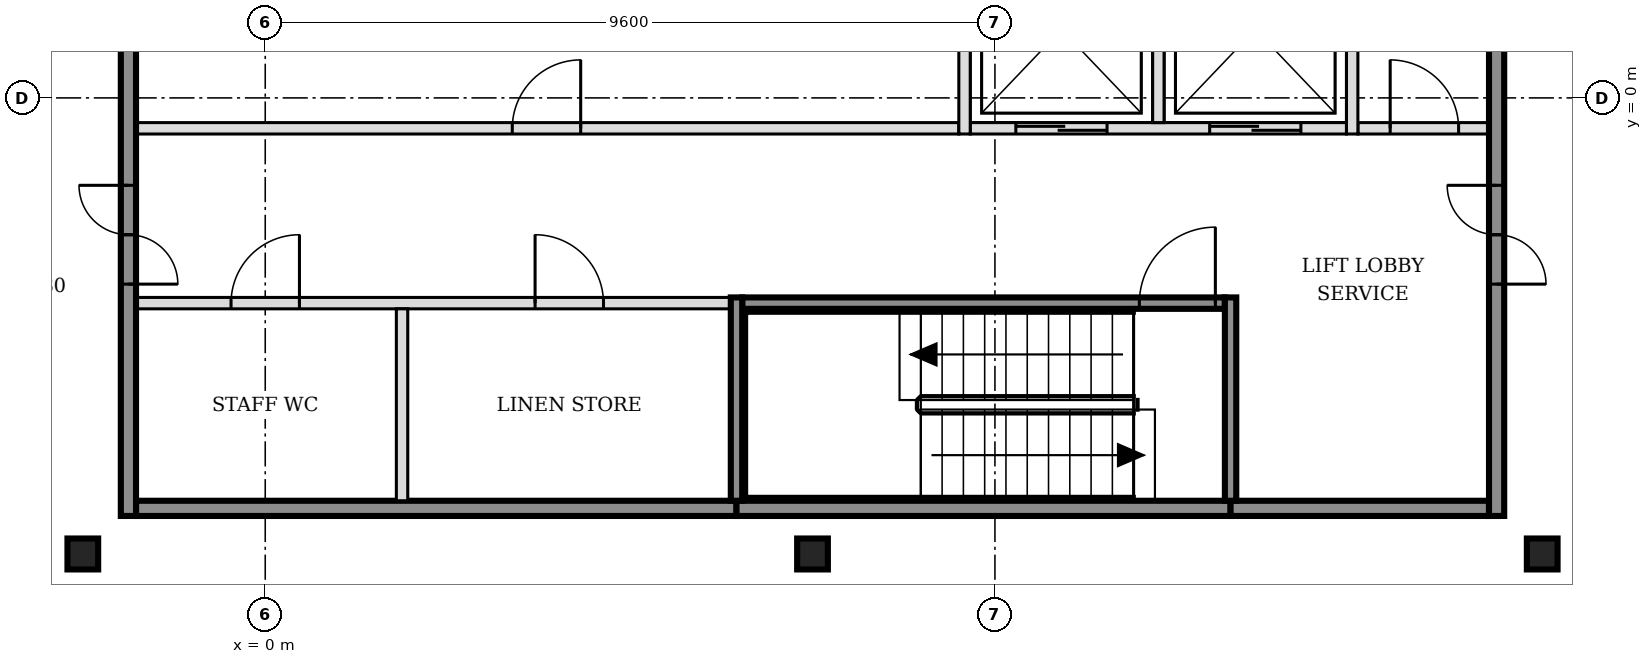
"""IFC4 building model, lengths in metres.
Left out: names, types, materials, properties, quantities, classifications, styles, units other than length and angle.
Written with IfcOpenShell. Run it as: python <this file> out.ifc"""

import sys

from ifc_helpers import new_model, si_unit, direction, frame, frame_2d, origin, origin_2d, place, context, subcontext, project, spatial, rectangle, i_section, extrude, element, fill, save


model = new_model("IFC4")
c1 = context("Model", 3, precision=1e-05, world=origin(), true_north=direction((0.0, 1.0)))
c2 = subcontext(c1, "Body", "Model", "MODEL_VIEW")
j1 = project(units=[si_unit("LENGTHUNIT", "METRE"), si_unit("PLANEANGLEUNIT", "RADIAN")], contexts=[c1])
p1 = place(None, origin())
s1 = spatial("IfcSite", under=j1, at=p1, CompositionType="ELEMENT")
p2 = place(p1, origin())
s2 = spatial("IfcBuilding", under=s1, at=p2, CompositionType="ELEMENT")
p3 = place(p2, frame((0.0, 0.0, 232.2)))
s3 = spatial("IfcBuildingStorey", under=s2, at=p3, CompositionType="ELEMENT", Elevation=232.2)
for number, where, z_axis, x_axis in (
    (1, (-2.4, -6.0, -0.15), (0.0, 0.0, 1.0), (1.0, 0.0, 0.0)),
    (2, (7.2, -6.0, -0.15), (0.0, 0.0, 1.0), (1.0, 0.0, 0.0)),
    (3, (16.8, -6.0, -0.15), (0.0, 0.0, 1.0), (1.0, 0.0, 0.0)),
):
    element("IfcColumn", number, at=place(p3, frame(where, z_axis=z_axis, x_axis=x_axis)), inside=s3, PredefinedType="COLUMN", context=c2, shape_type="SweptSolid", body=[
        extrude(i_section(OverallWidth=0.404, OverallDepth=0.407, WebThickness=0.027, FlangeThickness=0.044, FilletRadius=0.015, at=origin_2d()), origin(), (0.0, 0.0, 1.0), 3.6),
    ])
p4 = place(p3, frame((-1.7, -5.4, 0.0), z_axis=(0.0, 0.0, 1.0), x_axis=(1.0, 0.0, 0.0)))
e4 = element("IfcWall", 4, at=p4, inside=s3, PredefinedType="SOLIDWALL", context=c2, shape_type="SweptSolid", body=[
    extrude(rectangle(XDim=7.9, YDim=0.2, at=frame_2d((3.95, 0.0))), origin(), (0.0, 0.0, 1.0), 3.45),
])
p5 = place(p3, frame((6.2, -5.4, 0.0), z_axis=(0.0, 0.0, 1.0), x_axis=(1.0, 0.0, 0.0)))
e5 = element("IfcWall", 5, at=p5, inside=s3, PredefinedType="SOLIDWALL", context=c2, shape_type="SweptSolid", body=[
    extrude(rectangle(XDim=6.5, YDim=0.2, at=frame_2d((3.25, 0.0))), origin(), (0.0, 0.0, 1.0), 3.45),
])
p6 = place(p3, frame((12.7, -5.4, 0.0), z_axis=(0.0, 0.0, 1.0), x_axis=(1.0, 0.0, 0.0)))
e6 = element("IfcWall", 6, at=p6, inside=s3, PredefinedType="SOLIDWALL", context=c2, shape_type="SweptSolid", body=[
    extrude(rectangle(XDim=3.4, YDim=0.2, at=frame_2d((1.7, 0.0))), origin(), (0.0, 0.0, 1.0), 3.45),
])
p7 = place(p3, frame((-1.7, -2.7, 0.0), z_axis=(0.0, 0.0, 1.0), x_axis=(1.0, 0.0, 0.0)))
e7 = element("IfcWall", 7, at=p7, inside=s3, PredefinedType="PARTITIONING", context=c2, shape_type="SweptSolid", body=[
    extrude(rectangle(XDim=7.825, YDim=0.15, at=frame_2d((3.913, 0.0))), origin(), (0.0, 0.0, 1.0), 3.45),
])
p8 = place(p7, frame((1.25, 0.0, 0.0)))
e8 = element("IfcOpeningElement", 8, at=p8, cuts=e7, PredefinedType="OPENING", context=c2, shape_type="SweptSolid", body=[
    extrude(rectangle(XDim=0.9, YDim=2.1, at=frame_2d((0.45, 1.05))), frame((0.0, 0.085, 0.0), z_axis=(0.0, -1.0, 0.0), x_axis=(1.0, 0.0, 0.0)), (0.0, 0.0, 1.0), 0.17),
])
p9 = place(p7, frame((5.25, 0.0, 0.0)))
e9 = element("IfcOpeningElement", 9, at=p9, cuts=e7, PredefinedType="OPENING", context=c2, shape_type="SweptSolid", body=[
    extrude(rectangle(XDim=0.9, YDim=2.1, at=frame_2d((0.45, 1.05))), frame((0.0, 0.085, 0.0), z_axis=(0.0, -1.0, 0.0), x_axis=(1.0, 0.0, 0.0)), (0.0, 0.0, 1.0), 0.17),
])
p10 = place(p3, frame((6.275, -2.7, 0.0), z_axis=(0.0, 0.0, 1.0), x_axis=(1.0, 0.0, 0.0)))
e10 = element("IfcWall", 10, at=p10, inside=s3, PredefinedType="SOLIDWALL", context=c2, shape_type="SweptSolid", body=[
    extrude(rectangle(XDim=6.35, YDim=0.15, at=frame_2d((3.175, 0.0))), origin(), (0.0, 0.0, 1.0), 3.45),
])
p11 = place(p10, frame((5.225, 0.0, 0.0)))
e11 = element("IfcOpeningElement", 11, at=p11, cuts=e10, PredefinedType="OPENING", context=c2, shape_type="SweptSolid", body=[
    extrude(rectangle(XDim=1.0, YDim=2.1, at=frame_2d((0.5, 1.05))), frame((0.0, 0.085, 0.0), z_axis=(0.0, -1.0, 0.0), x_axis=(1.0, 0.0, 0.0)), (0.0, 0.0, 1.0), 0.17),
])
p12 = place(p3, frame((-1.7, -0.4, 0.0), z_axis=(0.0, 0.0, 1.0), x_axis=(1.0, 0.0, 0.0)))
e12 = element("IfcWall", 12, at=p12, inside=s3, PredefinedType="PARTITIONING", context=c2, shape_type="SweptSolid", body=[
    extrude(rectangle(XDim=10.825, YDim=0.15, at=frame_2d((5.413, 0.0))), origin(), (0.0, 0.0, 1.0), 3.45),
])
p13 = place(p12, frame((4.95, 0.0, 0.0)))
e13 = element("IfcOpeningElement", 13, at=p13, cuts=e12, PredefinedType="OPENING", context=c2, shape_type="SweptSolid", body=[
    extrude(rectangle(XDim=0.9, YDim=2.1, at=frame_2d((0.45, 1.05))), frame((0.0, 0.085, 0.0), z_axis=(0.0, -1.0, 0.0), x_axis=(1.0, 0.0, 0.0)), (0.0, 0.0, 1.0), 0.17),
])
p14 = place(p3, frame((9.275, -0.4, 0.0), z_axis=(0.0, 0.0, 1.0), x_axis=(1.0, 0.0, 0.0)))
e14 = element("IfcWall", 14, at=p14, inside=s3, PredefinedType="SOLIDWALL", context=c2, shape_type="SweptSolid", body=[
    extrude(rectangle(XDim=4.95, YDim=0.15, at=frame_2d((2.475, 0.0))), origin(), (0.0, 0.0, 1.0), 3.45),
])
p15 = place(p14, frame((0.6, 0.0, 0.0)))
e15 = element("IfcOpeningElement", 15, at=p15, cuts=e14, PredefinedType="OPENING", context=c2, shape_type="SweptSolid", body=[
    extrude(rectangle(XDim=1.2, YDim=2.1, at=frame_2d((0.6, 1.05))), frame((0.0, 0.085, 0.0), z_axis=(0.0, -1.0, 0.0), x_axis=(1.0, 0.0, 0.0)), (0.0, 0.0, 1.0), 0.17),
])
p16 = place(p14, frame((3.15, 0.0, 0.0)))
e16 = element("IfcOpeningElement", 16, at=p16, cuts=e14, PredefinedType="OPENING", context=c2, shape_type="SweptSolid", body=[
    extrude(rectangle(XDim=1.2, YDim=2.1, at=frame_2d((0.6, 1.05))), frame((0.0, 0.085, 0.0), z_axis=(0.0, -1.0, 0.0), x_axis=(1.0, 0.0, 0.0)), (0.0, 0.0, 1.0), 0.17),
])
p17 = place(p3, frame((14.375, -0.4, 0.0), z_axis=(0.0, 0.0, 1.0), x_axis=(1.0, 0.0, 0.0)))
e17 = element("IfcWall", 17, at=p17, inside=s3, PredefinedType="PARTITIONING", context=c2, shape_type="SweptSolid", body=[
    extrude(rectangle(XDim=1.725, YDim=0.15, at=frame_2d((0.863, 0.0))), origin(), (0.0, 0.0, 1.0), 3.45),
])
p18 = place(p17, frame((0.425, 0.0, 0.0)))
e18 = element("IfcOpeningElement", 18, at=p18, cuts=e17, PredefinedType="OPENING", context=c2, shape_type="SweptSolid", body=[
    extrude(rectangle(XDim=0.9, YDim=2.1, at=frame_2d((0.45, 1.05))), frame((0.0, 0.085, 0.0), z_axis=(0.0, -1.0, 0.0), x_axis=(1.0, 0.0, 0.0)), (0.0, 0.0, 1.0), 0.17),
])
p19 = place(p3, frame((-1.8, -5.5, 0.0), z_axis=(0.0, 0.0, 1.0), x_axis=(0.0, 1.0, 0.0)))
e19 = element("IfcWall", 19, at=p19, inside=s3, PredefinedType="SOLIDWALL", context=c2, shape_type="SweptSolid", body=[
    extrude(rectangle(XDim=15.8, YDim=0.2, at=frame_2d((7.9, 0.0))), origin(), (0.0, 0.0, 1.0), 3.45),
])
p20 = place(p19, frame((3.05, 0.0, 0.0)))
e20 = element("IfcOpeningElement", 20, at=p20, cuts=e19, PredefinedType="OPENING", context=c2, shape_type="SweptSolid", body=[
    extrude(rectangle(XDim=1.3, YDim=2.1, at=frame_2d((0.65, 1.05))), frame((0.0, 0.11, 0.0), z_axis=(0.0, -1.0, 0.0), x_axis=(1.0, 0.0, 0.0)), (0.0, 0.0, 1.0), 0.22),
])
p21 = place(p19, frame((11.45, 0.0, 0.0)))
e21 = element("IfcOpeningElement", 21, at=p21, cuts=e19, PredefinedType="OPENING", context=c2, shape_type="SweptSolid", body=[
    extrude(rectangle(XDim=1.3, YDim=2.1, at=frame_2d((0.65, 1.05))), frame((0.0, 0.11, 0.0), z_axis=(0.0, -1.0, 0.0), x_axis=(1.0, 0.0, 0.0)), (0.0, 0.0, 1.0), 0.22),
])
p22 = place(p3, frame((1.8, -5.3, 0.0), z_axis=(0.0, 0.0, 1.0), x_axis=(0.0, 1.0, 0.0)))
e22 = element("IfcWall", 22, at=p22, inside=s3, PredefinedType="PARTITIONING", context=c2, shape_type="SweptSolid", body=[
    extrude(rectangle(XDim=2.525, YDim=0.15, at=frame_2d((1.263, 0.0))), origin(), (0.0, 0.0, 1.0), 3.45),
])
p23 = place(p3, frame((6.2, -5.3, 0.0), z_axis=(0.0, 0.0, 1.0), x_axis=(0.0, 1.0, 0.0)))
e23 = element("IfcWall", 23, at=p23, inside=s3, PredefinedType="SOLIDWALL", context=c2, shape_type="SweptSolid", body=[
    extrude(rectangle(XDim=2.675, YDim=0.15, at=frame_2d((1.337, 0.0))), origin(), (0.0, 0.0, 1.0), 3.45),
])
p24 = place(p3, frame((9.2, -0.475, 0.0), z_axis=(0.0, 0.0, 1.0), x_axis=(0.0, 1.0, 0.0)))
e24 = element("IfcWall", 24, at=p24, inside=s3, PredefinedType="SOLIDWALL", context=c2, shape_type="SweptSolid", body=[
    extrude(rectangle(XDim=2.6, YDim=0.15, at=frame_2d((1.3, 0.0))), origin(), (0.0, 0.0, 1.0), 3.45),
])
p25 = place(p3, frame((11.75, -0.325, 0.0), z_axis=(0.0, 0.0, 1.0), x_axis=(0.0, 1.0, 0.0)))
e25 = element("IfcWall", 25, at=p25, inside=s3, PredefinedType="SOLIDWALL", context=c2, shape_type="SweptSolid", body=[
    extrude(rectangle(XDim=2.45, YDim=0.15, at=frame_2d((1.225, 0.0))), origin(), (0.0, 0.0, 1.0), 3.45),
])
p26 = place(p3, frame((12.7, -5.3, 0.0), z_axis=(0.0, 0.0, 1.0), x_axis=(0.0, 1.0, 0.0)))
e26 = element("IfcWall", 26, at=p26, inside=s3, PredefinedType="SOLIDWALL", context=c2, shape_type="SweptSolid", body=[
    extrude(rectangle(XDim=2.675, YDim=0.15, at=frame_2d((1.337, 0.0))), origin(), (0.0, 0.0, 1.0), 3.45),
])
p27 = place(p3, frame((14.3, -0.475, 0.0), z_axis=(0.0, 0.0, 1.0), x_axis=(0.0, 1.0, 0.0)))
e27 = element("IfcWall", 27, at=p27, inside=s3, PredefinedType="SOLIDWALL", context=c2, shape_type="SweptSolid", body=[
    extrude(rectangle(XDim=2.75, YDim=0.15, at=frame_2d((1.375, 0.0))), origin(), (0.0, 0.0, 1.0), 3.45),
])
p28 = place(p3, frame((16.2, -5.5, 0.0), z_axis=(0.0, 0.0, 1.0), x_axis=(0.0, 1.0, 0.0)))
e28 = element("IfcWall", 28, at=p28, inside=s3, PredefinedType="SOLIDWALL", context=c2, shape_type="SweptSolid", body=[
    extrude(rectangle(XDim=15.8, YDim=0.2, at=frame_2d((7.9, 0.0))), origin(), (0.0, 0.0, 1.0), 3.45),
])
p29 = place(p28, frame((3.05, 0.0, 0.0)))
e29 = element("IfcOpeningElement", 29, at=p29, cuts=e28, PredefinedType="OPENING", context=c2, shape_type="SweptSolid", body=[
    extrude(rectangle(XDim=1.3, YDim=2.1, at=frame_2d((0.65, 1.05))), frame((0.0, 0.11, 0.0), z_axis=(0.0, -1.0, 0.0), x_axis=(1.0, 0.0, 0.0)), (0.0, 0.0, 1.0), 0.22),
])
p30 = place(p28, frame((11.45, 0.0, 0.0)))
e30 = element("IfcOpeningElement", 30, at=p30, cuts=e28, PredefinedType="OPENING", context=c2, shape_type="SweptSolid", body=[
    extrude(rectangle(XDim=1.3, YDim=2.1, at=frame_2d((0.65, 1.05))), frame((0.0, 0.11, 0.0), z_axis=(0.0, -1.0, 0.0), x_axis=(1.0, 0.0, 0.0)), (0.0, 0.0, 1.0), 0.22),
])
p31 = place(p15, origin())
e31 = element("IfcDoor", 31, at=p31, inside=s3, OperationType="DOUBLE_DOOR_SLIDING", PredefinedType="DOOR", context=c2, shape_type="SweptSolid", body=[
    extrude(rectangle(XDim=1.2, YDim=2.1, at=frame_2d((0.6, 1.05))), frame((0.0, 0.025, 0.0), z_axis=(0.0, -1.0, 0.0), x_axis=(1.0, 0.0, 0.0)), (0.0, 0.0, 1.0), 0.05),
])
fill(e15, e31)
p32 = place(p16, origin())
e32 = element("IfcDoor", 32, at=p32, inside=s3, OperationType="DOUBLE_DOOR_SLIDING", PredefinedType="DOOR", context=c2, shape_type="SweptSolid", body=[
    extrude(rectangle(XDim=1.2, YDim=2.1, at=frame_2d((0.6, 1.05))), frame((0.0, 0.025, 0.0), z_axis=(0.0, -1.0, 0.0), x_axis=(1.0, 0.0, 0.0)), (0.0, 0.0, 1.0), 0.05),
])
fill(e16, e32)
p33 = place(p11, origin())
e33 = element("IfcDoor", 33, at=p33, inside=s3, OperationType="SINGLE_SWING_RIGHT", PredefinedType="DOOR", context=c2, shape_type="SweptSolid", body=[
    extrude(rectangle(XDim=1.0, YDim=2.1, at=frame_2d((0.5, 1.05))), frame((0.0, 0.025, 0.0), z_axis=(0.0, -1.0, 0.0), x_axis=(1.0, 0.0, 0.0)), (0.0, 0.0, 1.0), 0.05),
])
fill(e11, e33)
p34 = place(p20, origin())
e34 = element("IfcDoor", 34, at=p34, inside=s3, OperationType="DOUBLE_DOOR_SINGLE_SWING", PredefinedType="DOOR", context=c2, shape_type="SweptSolid", body=[
    extrude(rectangle(XDim=1.3, YDim=2.1, at=frame_2d((0.65, 1.05))), frame((0.0, 0.025, 0.0), z_axis=(0.0, -1.0, 0.0), x_axis=(1.0, 0.0, 0.0)), (0.0, 0.0, 1.0), 0.05),
])
fill(e20, e34)
p35 = place(p29, origin())
e35 = element("IfcDoor", 35, at=p35, inside=s3, OperationType="DOUBLE_DOOR_SINGLE_SWING", PredefinedType="DOOR", context=c2, shape_type="SweptSolid", body=[
    extrude(rectangle(XDim=1.3, YDim=2.1, at=frame_2d((0.65, 1.05))), frame((0.0, 0.025, 0.0), z_axis=(0.0, -1.0, 0.0), x_axis=(1.0, 0.0, 0.0)), (0.0, 0.0, 1.0), 0.05),
])
fill(e29, e35)
p36 = place(p18, origin())
e36 = element("IfcDoor", 36, at=p36, inside=s3, OperationType="SINGLE_SWING_LEFT", PredefinedType="DOOR", context=c2, shape_type="SweptSolid", body=[
    extrude(rectangle(XDim=0.9, YDim=2.1, at=frame_2d((0.45, 1.05))), frame((0.0, 0.025, 0.0), z_axis=(0.0, -1.0, 0.0), x_axis=(1.0, 0.0, 0.0)), (0.0, 0.0, 1.0), 0.05),
])
fill(e18, e36)
p37 = place(p8, origin())
e37 = element("IfcDoor", 37, at=p37, inside=s3, OperationType="SINGLE_SWING_RIGHT", PredefinedType="DOOR", context=c2, shape_type="SweptSolid", body=[
    extrude(rectangle(XDim=0.9, YDim=2.1, at=frame_2d((0.45, 1.05))), frame((0.0, 0.025, 0.0), z_axis=(0.0, -1.0, 0.0), x_axis=(1.0, 0.0, 0.0)), (0.0, 0.0, 1.0), 0.05),
])
fill(e8, e37)
p38 = place(p9, origin())
e38 = element("IfcDoor", 38, at=p38, inside=s3, OperationType="SINGLE_SWING_LEFT", PredefinedType="DOOR", context=c2, shape_type="SweptSolid", body=[
    extrude(rectangle(XDim=0.9, YDim=2.1, at=frame_2d((0.45, 1.05))), frame((0.0, 0.025, 0.0), z_axis=(0.0, -1.0, 0.0), x_axis=(1.0, 0.0, 0.0)), (0.0, 0.0, 1.0), 0.05),
])
fill(e9, e38)
p39 = place(p13, origin())
e39 = element("IfcDoor", 39, at=p39, inside=s3, OperationType="SINGLE_SWING_RIGHT", PredefinedType="DOOR", context=c2, shape_type="SweptSolid", body=[
    extrude(rectangle(XDim=0.9, YDim=2.1, at=frame_2d((0.45, 1.05))), frame((0.0, 0.025, 0.0), z_axis=(0.0, -1.0, 0.0), x_axis=(1.0, 0.0, 0.0)), (0.0, 0.0, 1.0), 0.05),
])
fill(e13, e39)
save(model, sys.argv[1])
